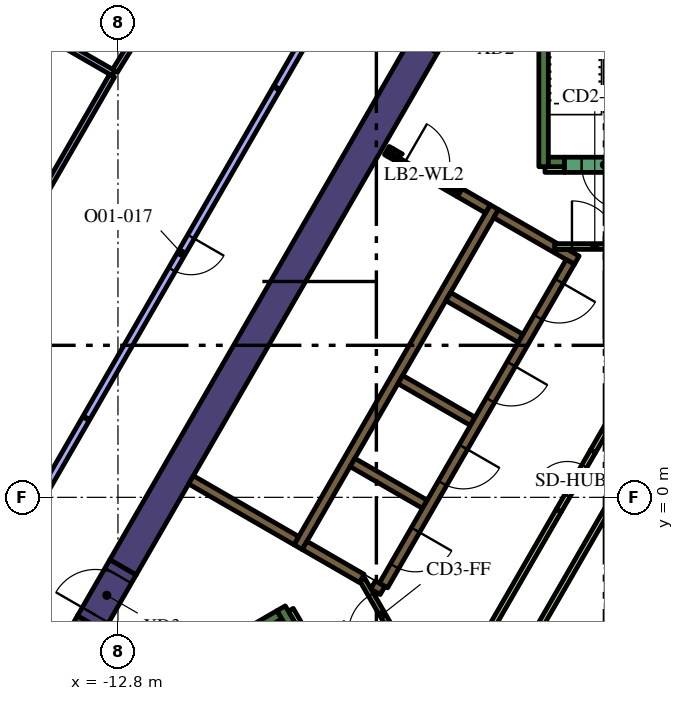
"""IFC4 building model, lengths in metres.
Left out: names, types, materials, properties, quantities, classifications, styles, units other than length and angle.
Written with IfcOpenShell. Run it as: python <this file> out.ifc"""

import sys

from ifc_helpers import new_model, si_unit, direction, frame, frame_2d, origin, place, context, subcontext, project, spatial, polyline, rectangle, outline, extrude, element, fill, save


model = new_model("IFC4")
c1 = context("Model", 3, precision=1e-05, world=origin(), true_north=direction((0.0, 1.0)))
c2 = subcontext(c1, "Body", "Model", "MODEL_VIEW")
j1 = project(units=[si_unit("LENGTHUNIT", "METRE"), si_unit("PLANEANGLEUNIT", "RADIAN")], contexts=[c1])
p1 = place(None, origin())
s1 = spatial("IfcSite", under=j1, at=p1, CompositionType="ELEMENT")
p2 = place(p1, origin())
s2 = spatial("IfcBuilding", under=s1, at=p2, CompositionType="ELEMENT")
p3 = place(p2, frame((0.0, 0.0, 145.8)))
s3 = spatial("IfcBuildingStorey", under=s2, at=p3, CompositionType="ELEMENT", Elevation=145.8)
p4 = place(p3, frame((-13.518, -3.314, 0.0), z_axis=(0.0, 0.0, 1.0), x_axis=(-0.499969377405, -0.866043083026, 0.0)))
e1 = element("IfcWall", 1, at=p4, inside=s3, PredefinedType="SOLIDWALL", context=c2, shape_type="SweptSolid", body=[
    extrude(rectangle(XDim=2.824, YDim=0.8, at=frame_2d((1.412, 0.0))), origin(), (0.0, 0.0, 1.0), 4.2),
])
p5 = place(p3, frame((-12.668, -1.842, 0.0), z_axis=(0.0, 0.0, 1.0), x_axis=(0.500003640647, 0.866023301845, 0.0)))
e2 = element("IfcWall", 2, at=p5, inside=s3, PredefinedType="SOLIDWALL", context=c2, shape_type="SweptSolid", body=[
    extrude(rectangle(XDim=15.858, YDim=0.8, at=frame_2d((7.929, 0.0))), origin(), (0.0, 0.0, 1.0), 4.2),
])
p6 = place(p3, frame((-1.6, 8.7, 0.0), z_axis=(0.0, 0.0, 1.0), x_axis=(0.0, 1.0, 0.0)))
e3 = element("IfcWall", 3, at=p6, inside=s3, PredefinedType="SOLIDWALL", context=c2, shape_type="SweptSolid", body=[
    extrude(rectangle(XDim=7.05, YDim=0.25, at=frame_2d((3.525, 0.0))), origin(), (0.0, 0.0, 1.0), 4.2),
])
p7 = place(p3, frame((-1.475, 8.825, 0.0), z_axis=(0.0, 0.0, 1.0), x_axis=(1.0, 0.0, 0.0)))
e4 = element("IfcWall", 4, at=p7, inside=s3, PredefinedType="SOLIDWALL", context=c2, shape_type="SweptSolid", body=[
    extrude(rectangle(XDim=0.425, YDim=0.25, at=frame_2d((0.212, 0.0))), origin(), (0.0, 0.0, 1.0), 4.2),
])
p8 = place(p3, frame((-14.44, -6.49, 0.0), z_axis=(0.0, 0.0, 1.0), x_axis=(0.866022966069, 0.500004222222, 0.0)))
e5 = element("IfcWall", 5, at=p8, inside=s3, PredefinedType="SOLIDWALL", context=c2, shape_type="SweptSolid", body=[
    extrude(rectangle(XDim=6.8, YDim=0.25, at=frame_2d((3.4, 0.0))), origin(), (0.0, 0.0, 1.0), 4.2),
])
p9 = place(p3, frame((-8.168, -3.503, 0.0), z_axis=(0.0, 0.0, 1.0), x_axis=(-0.499952099219, 0.866053057547, 0.0)))
e6 = element("IfcWall", 6, at=p9, inside=s3, PredefinedType="SOLIDWALL", context=c2, shape_type="SweptSolid", body=[
    extrude(rectangle(XDim=0.675, YDim=0.25, at=frame_2d((0.337, 0.0))), origin(), (0.0, 0.0, 1.0), 4.2),
])
p10 = place(p3, frame((-8.06, -1.311, 0.0), z_axis=(0.0, 0.0, 1.0), x_axis=(0.50000273126, 0.866023826885, 0.0)))
e7 = element("IfcWall", 7, at=p10, inside=s3, PredefinedType="SOLIDWALL", context=c2, shape_type="SweptSolid", body=[
    extrude(rectangle(XDim=10.33, YDim=0.25, at=frame_2d((5.165, 0.0))), origin(), (0.0, 0.0, 1.0), 4.2),
])
p11 = place(p3, origin())
e8 = element("IfcWall", 8, at=p11, inside=s3, PredefinedType="SOLIDWALL", context=c2, shape_type="SweptSolid", body=[
    extrude(outline(polyline([(-2.912, 7.356), (-2.787, 7.573), (-1.232, 6.675), (-1.303, 6.675), (-1.304, 6.675), (-1.304, 6.675), (-1.304, 6.525), (-1.304, 6.525), (-1.303, 6.525), (-0.971, 6.525), (-0.665, 6.348), (-0.79, 6.132), (-1.007, 6.257), (-1.007, 6.257), (-2.912, 7.356)])), origin(), (0.0, 0.0, 1.0), 4.2),
])
for number, where, z_axis, x_axis in (
    (9, (-2.204, 4.182, 0.0), (0.0, 0.0, 1.0), (-0.866, 0.5, 0.0)),
    (10, (-5.369, 3.1, 0.0), (0.0, 0.0, 1.0), (0.866, -0.5, 0.0)),
    (11, (-4.724, -0.182, 0.0), (0.0, 0.0, 1.0), (-0.866, 0.5, 0.0)),
):
    element("IfcWall", number, at=place(p3, frame(where, z_axis=z_axis, x_axis=x_axis)), inside=s3, PredefinedType="SOLIDWALL", context=c2, shape_type="SweptSolid", body=[
        extrude(rectangle(XDim=2.2, YDim=0.25, at=frame_2d((1.1, 0.0))), origin(), (0.0, 0.0, 1.0), 4.2),
    ])
p12 = place(p3, frame((-6.088, -2.305, 0.0), z_axis=(0.0, 0.0, 1.0), x_axis=(0.866059450854, -0.499941024108, 0.0)))
e12 = element("IfcWall", 12, at=p12, inside=s3, PredefinedType="SOLIDWALL", context=c2, shape_type="SweptSolid", body=[
    extrude(rectangle(XDim=0.29, YDim=0.25, at=frame_2d((0.145, 0.0))), origin(), (0.0, 0.0, 1.0), 4.2),
])
p13 = place(p3, frame((-7.889, -1.265, 0.0), z_axis=(0.0, 0.0, 1.0), x_axis=(0.865986741702, -0.500066958712, 0.0)))
e13 = element("IfcWall", 13, at=p13, inside=s3, PredefinedType="SOLIDWALL", context=c2, shape_type="SweptSolid", body=[
    extrude(rectangle(XDim=1.738, YDim=0.25, at=frame_2d((0.869, 0.0))), origin(), (0.0, 0.0, 1.0), 4.2),
])
p14 = place(p3, frame((-8.106, -1.14, 0.0), z_axis=(0.0, 0.0, 1.0), x_axis=(-0.866008981251, 0.500028443584, 0.0)))
e14 = element("IfcWall", 14, at=p14, inside=s3, PredefinedType="SOLIDWALL", context=c2, shape_type="SweptSolid", body=[
    extrude(rectangle(XDim=3.2, YDim=0.25, at=frame_2d((1.6, 0.0))), origin(), (0.0, 0.0, 1.0), 4.2),
])
p15 = place(p3, frame((-5.725, 9.125, 0.0), z_axis=(0.0, 0.0, 1.0), x_axis=(0.866185586049, -0.49972245349, 0.0)))
e15 = element("IfcWall", 15, at=p15, inside=s3, PredefinedType="SOLIDWALL", context=c2, shape_type="SweptSolid", body=[
    extrude(rectangle(XDim=0.11, YDim=0.25, at=frame_2d((0.055, 0.0))), origin(), (0.0, 0.0, 1.0), 4.2),
])
p16 = place(p3, frame((-3.066, 7.59, 0.0), z_axis=(0.0, 0.0, 1.0), x_axis=(-0.866081358704, 0.49990307071, 0.0)))
e16 = element("IfcWall", 16, at=p16, inside=s3, PredefinedType="SOLIDWALL", context=c2, shape_type="SweptSolid", body=[
    extrude(rectangle(XDim=0.858, YDim=0.25, at=frame_2d((0.429, 0.0))), origin(), (0.0, 0.0, 1.0), 4.2),
])
e17 = element("IfcWall", 17, at=p11, inside=s3, PredefinedType="SOLIDWALL", context=c2, shape_type="SweptSolid", body=[
    extrude(outline(polyline([(-3.748, 8.128), (-3.813, 8.015), (-4.027, 8.139), (-4.017, 8.156), (-4.008, 8.173), (-4.0, 8.192), (-3.995, 8.21), (-3.991, 8.23), (-3.99, 8.25), (-3.99, 8.268), (-3.748, 8.128)])), origin(), (0.0, 0.0, 1.0), 4.2),
])
e18 = element("IfcWall", 18, at=p11, inside=s3, PredefinedType="SOLIDWALL", context=c2, shape_type="SweptSolid", body=[
    extrude(outline(polyline([(-5.689, 8.96), (-5.69, 8.961), (-5.565, 9.177), (-5.319, 9.035), (-5.335, 9.026), (-5.351, 9.015), (-5.366, 9.002), (-5.379, 8.988), (-5.392, 8.972), (-5.402, 8.956), (-5.412, 8.939), (-5.629, 9.064), (-5.629, 9.064), (-5.689, 8.96)])), origin(), (0.0, 0.0, 1.0), 4.2),
])
for number, where, z_axis, x_axis in (
    (19, (-8.252, -2.958, 0.0), (0.0, 0.0, 1.0), (0.5, -0.866, 0.0)),
    (20, (-1.564, 8.625, 0.0), (0.0, 0.0, 1.0), (1.0, 0.0, 0.0)),
):
    element("IfcWall", number, at=place(p3, frame(where, z_axis=z_axis, x_axis=x_axis)), inside=s3, PredefinedType="PARTITIONING", context=c2, shape_type="SweptSolid", body=[
        extrude(rectangle(XDim=0.514, YDim=0.15, at=frame_2d((0.257, 0.0))), origin(), (0.0, 0.0, 1.0), 3.15),
    ])
p17 = place(p3, frame((-1.887, -3.718, 0.0), z_axis=(0.0, 0.0, 1.0), x_axis=(0.500005008002, 0.866022512394, 0.0)))
e21 = element("IfcWall", 21, at=p17, inside=s3, PredefinedType="PARTITIONING", context=c2, shape_type="SweptSolid", body=[
    extrude(rectangle(XDim=8.327, YDim=0.15, at=frame_2d((4.164, 0.0))), origin(), (0.0, 0.0, 1.0), 3.15),
])
p18 = place(p3, frame((-3.147, -3.718, 0.0), z_axis=(0.0, 0.0, 1.0), x_axis=(0.500010131483, 0.866019554291, 0.0)))
e22 = element("IfcWall", 22, at=p18, inside=s3, PredefinedType="PARTITIONING", context=c2, shape_type="SweptSolid", body=[
    extrude(rectangle(XDim=3.894, YDim=0.15, at=frame_2d((1.947, 0.0))), origin(), (0.0, 0.0, 1.0), 3.15),
])
p19 = place(p3, frame((-0.3, 1.212, 0.0), z_axis=(0.0, 0.0, 1.0), x_axis=(0.499963101113, 0.866046706318, 0.0)))
e23 = element("IfcWall", 23, at=p19, inside=s3, PredefinedType="PARTITIONING", context=c2, shape_type="SweptSolid", body=[
    extrude(rectangle(XDim=3.893, YDim=0.15, at=frame_2d((1.947, 0.0))), origin(), (0.0, 0.0, 1.0), 3.15),
])
p20 = place(p3, frame((-0.898, 6.194, 0.0), z_axis=(0.0, 0.0, 1.0), x_axis=(-0.499996202215, -0.866027596426, 0.0)))
e24 = element("IfcWall", 24, at=p20, inside=s3, PredefinedType="SOLIDWALL", context=c2, shape_type="SweptSolid", body=[
    extrude(rectangle(XDim=9.83, YDim=0.25, at=frame_2d((4.915, 0.0))), origin(), (0.0, 0.0, 1.0), 4.2),
])
p21 = place(p20, frame((0.585, 0.0, 0.0)))
e25 = element("IfcOpeningElement", 25, at=p21, cuts=e24, PredefinedType="OPENING", context=c2, shape_type="SweptSolid", body=[
    extrude(rectangle(XDim=1.1, YDim=2.1, at=frame_2d((0.55, 1.05))), frame((0.0, 0.135, 0.0), z_axis=(0.0, -1.0, 0.0), x_axis=(1.0, 0.0, 0.0)), (0.0, 0.0, 1.0), 0.27),
])
p22 = place(p20, frame((3.105, 0.0, 0.0)))
e26 = element("IfcOpeningElement", 26, at=p22, cuts=e24, PredefinedType="OPENING", context=c2, shape_type="SweptSolid", body=[
    extrude(rectangle(XDim=1.1, YDim=2.1, at=frame_2d((0.55, 1.05))), frame((0.0, 0.135, 0.0), z_axis=(0.0, -1.0, 0.0), x_axis=(1.0, 0.0, 0.0)), (0.0, 0.0, 1.0), 0.27),
])
p23 = place(p20, frame((5.625, 0.0, 0.0)))
e27 = element("IfcOpeningElement", 27, at=p23, cuts=e24, PredefinedType="OPENING", context=c2, shape_type="SweptSolid", body=[
    extrude(rectangle(XDim=1.1, YDim=2.1, at=frame_2d((0.55, 1.05))), frame((0.0, 0.135, 0.0), z_axis=(0.0, -1.0, 0.0), x_axis=(1.0, 0.0, 0.0)), (0.0, 0.0, 1.0), 0.27),
])
p24 = place(p20, frame((8.145, 0.0, 0.0)))
e28 = element("IfcOpeningElement", 28, at=p24, cuts=e24, PredefinedType="OPENING", context=c2, shape_type="SweptSolid", body=[
    extrude(rectangle(XDim=1.1, YDim=2.1, at=frame_2d((0.55, 1.05))), frame((0.0, 0.135, 0.0), z_axis=(0.0, -1.0, 0.0), x_axis=(1.0, 0.0, 0.0)), (0.0, 0.0, 1.0), 0.27),
])
p25 = place(p3, frame((1.05, 8.75, 0.0), z_axis=(0.0, 0.0, 1.0), x_axis=(-1.0, 0.0, 0.0)))
e29 = element("IfcWall", 29, at=p25, inside=s3, PredefinedType="SOLIDWALL", context=c2, shape_type="SweptSolid", body=[
    extrude(rectangle(XDim=2.1, YDim=0.4, at=frame_2d((1.05, 0.0))), origin(), (0.0, 0.0, 1.0), 4.2),
])
p26 = place(p25, frame((0.45, 0.0, 0.0)))
e30 = element("IfcOpeningElement", 30, at=p26, cuts=e29, PredefinedType="OPENING", context=c2, shape_type="SweptSolid", body=[
    extrude(rectangle(XDim=1.2, YDim=2.1, at=frame_2d((0.6, 1.05))), frame((0.0, 0.21, 0.0), z_axis=(0.0, -1.0, 0.0), x_axis=(1.0, 0.0, 0.0)), (0.0, 0.0, 1.0), 0.42),
])
p27 = place(p3, frame((-1.303, 6.6, 0.0), z_axis=(0.0, 0.0, 1.0), x_axis=(1.0, 0.0, 0.0)))
e31 = element("IfcWall", 31, at=p27, inside=s3, PredefinedType="PARTITIONING", context=c2, shape_type="SweptSolid", body=[
    extrude(rectangle(XDim=2.1, YDim=0.15, at=frame_2d((1.05, 0.0))), origin(), (0.0, 0.0, 1.0), 4.2),
])
p28 = place(p27, frame((0.45, 0.0, 0.0)))
e32 = element("IfcOpeningElement", 32, at=p28, cuts=e31, PredefinedType="OPENING", context=c2, shape_type="SweptSolid", body=[
    extrude(rectangle(XDim=1.2, YDim=2.1, at=frame_2d((0.6, 1.05))), frame((0.0, 0.085, 0.0), z_axis=(0.0, -1.0, 0.0), x_axis=(1.0, 0.0, 0.0)), (0.0, 0.0, 1.0), 0.17),
])
p29 = place(p3, frame((-5.317, -3.99, 0.0), z_axis=(0.0, 0.0, 1.0), x_axis=(-0.500027713859, 0.866009402589, 0.0)))
e33 = element("IfcWall", 33, at=p29, inside=s3, PredefinedType="PARTITIONING", context=c2, shape_type="SweptSolid", body=[
    extrude(rectangle(XDim=2.1, YDim=0.15, at=frame_2d((1.05, 0.0))), origin(), (0.0, 0.0, 1.0), 4.2),
])
p30 = place(p29, frame((0.45, 0.0, 0.0)))
e34 = element("IfcOpeningElement", 34, at=p30, cuts=e33, PredefinedType="OPENING", context=c2, shape_type="SweptSolid", body=[
    extrude(rectangle(XDim=1.2, YDim=2.1, at=frame_2d((0.6, 1.05))), frame((0.0, 0.085, 0.0), z_axis=(0.0, -1.0, 0.0), x_axis=(1.0, 0.0, 0.0)), (0.0, 0.0, 1.0), 0.17),
])
p31 = place(p3, frame((-5.659, 9.012, 0.0), z_axis=(0.0, 0.0, 1.0), x_axis=(0.866009402589, -0.500027713859, 0.0)))
e35 = element("IfcWall", 35, at=p31, inside=s3, PredefinedType="PARTITIONING", context=c2, shape_type="SweptSolid", body=[
    extrude(rectangle(XDim=2.1, YDim=0.12, at=frame_2d((1.05, 0.0))), origin(), (0.0, 0.0, 1.0), 3.15),
])
p32 = place(p31, frame((0.45, 0.0, 0.0)))
e36 = element("IfcOpeningElement", 36, at=p32, cuts=e35, PredefinedType="OPENING", context=c2, shape_type="SweptSolid", body=[
    extrude(rectangle(XDim=1.2, YDim=2.1, at=frame_2d((0.6, 1.05))), frame((0.0, 0.07, 0.0), z_axis=(0.0, -1.0, 0.0), x_axis=(1.0, 0.0, 0.0)), (0.0, 0.0, 1.0), 0.14),
])
p33 = place(p3, frame((-4.739, 11.892, 0.0), z_axis=(0.0, 0.0, 1.0), x_axis=(0.500062241894, 0.865989465428, 0.0)))
e37 = element("IfcWall", 37, at=p33, inside=s3, PredefinedType="SOLIDWALL", context=c2, shape_type="SweptSolid", body=[
    extrude(rectangle(XDim=1.7, YDim=0.8, at=frame_2d((0.85, 0.0))), origin(), (0.0, 0.0, 1.0), 4.2),
])
p34 = place(p33, frame((0.25, 0.0, 0.0)))
e38 = element("IfcOpeningElement", 38, at=p34, cuts=e37, PredefinedType="OPENING", context=c2, shape_type="SweptSolid", body=[
    extrude(rectangle(XDim=1.2, YDim=2.1, at=frame_2d((0.6, 1.05))), frame((0.0, 0.41, 0.0), z_axis=(0.0, -1.0, 0.0), x_axis=(1.0, 0.0, 0.0)), (0.0, 0.0, 1.0), 0.82),
])
p35 = place(p3, frame((-13.518, -3.314, 0.0), z_axis=(0.0, 0.0, 1.0), x_axis=(0.500062241894, 0.865989465428, 0.0)))
e39 = element("IfcWall", 39, at=p35, inside=s3, PredefinedType="SOLIDWALL", context=c2, shape_type="SweptSolid", body=[
    extrude(rectangle(XDim=1.7, YDim=0.8, at=frame_2d((0.85, 0.0))), origin(), (0.0, 0.0, 1.0), 4.2),
])
p36 = place(p35, frame((0.25, 0.0, 0.0)))
e40 = element("IfcOpeningElement", 40, at=p36, cuts=e39, PredefinedType="OPENING", context=c2, shape_type="SweptSolid", body=[
    extrude(rectangle(XDim=1.2, YDim=2.1, at=frame_2d((0.6, 1.05))), frame((0.0, 0.41, 0.0), z_axis=(0.0, -1.0, 0.0), x_axis=(1.0, 0.0, 0.0)), (0.0, 0.0, 1.0), 0.82),
])
p37 = place(p3, frame((-1.2, -0.346, 0.0), z_axis=(0.0, 0.0, 1.0), x_axis=(0.499961193289, 0.866047807691, 0.0)))
e41 = element("IfcWall", 41, at=p37, inside=s3, PredefinedType="PARTITIONING", context=c2, shape_type="SweptSolid", body=[
    extrude(rectangle(XDim=1.8, YDim=0.15, at=frame_2d((0.9, 0.0))), origin(), (0.0, 0.0, 1.0), 3.15),
])
p38 = place(p37, frame((0.45, 0.0, 0.0)))
e42 = element("IfcOpeningElement", 42, at=p38, cuts=e41, PredefinedType="OPENING", context=c2, shape_type="SweptSolid", body=[
    extrude(rectangle(XDim=0.9, YDim=2.1, at=frame_2d((0.45, 1.05))), frame((0.0, 0.085, 0.0), z_axis=(0.0, -1.0, 0.0), x_axis=(1.0, 0.0, 0.0)), (0.0, 0.0, 1.0), 0.17),
])
p39 = place(p3, frame((-12.917, 11.16, 0.0), z_axis=(0.0, 0.0, 1.0), x_axis=(-0.866039125629, 0.499976232315, 0.0)))
e43 = element("IfcWall", 43, at=p39, inside=s3, PredefinedType="PARTITIONING", context=c2, shape_type="SweptSolid", body=[
    extrude(rectangle(XDim=3.442, YDim=0.15, at=frame_2d((1.721, 0.0))), origin(), (0.0, 0.0, 1.0), 3.15),
])
p40 = place(p3, frame((-12.877, 11.224, 0.0), z_axis=(0.0, 0.0, 1.0), x_axis=(0.526202711334, 0.850359163286, 0.0)))
e44 = element("IfcWall", 44, at=p40, inside=s3, PredefinedType="PARTITIONING", context=c2, shape_type="SweptSolid", body=[
    extrude(rectangle(XDim=6.142, YDim=0.15, at=frame_2d((3.071, 0.0))), origin(), (0.0, 0.0, 1.0), 3.15),
])
p41 = place(p40, frame((2.642, 0.0, 0.0)))
e45 = element("IfcOpeningElement", 45, at=p41, cuts=e44, PredefinedType="OPENING", context=c2, shape_type="SweptSolid", body=[
    extrude(rectangle(XDim=0.9, YDim=2.1, at=frame_2d((0.45, 1.05))), frame((0.0, 0.085, 0.0), z_axis=(0.0, -1.0, 0.0), x_axis=(1.0, 0.0, 0.0)), (0.0, 0.0, 1.0), 0.17),
])
p42 = place(p3, frame((-12.954, 11.095, 0.0), z_axis=(0.0, 0.0, 1.0), x_axis=(-0.500282785331, -0.865862076027, 0.0)))
e46 = element("IfcWall", 46, at=p42, inside=s3, PredefinedType="PARTITIONING", context=c2, shape_type="SweptSolid", body=[
    extrude(rectangle(XDim=6.273, YDim=0.15, at=frame_2d((3.136, 0.0))), origin(), (0.0, 0.0, 1.0), 3.15),
])
p43 = place(p3, frame((-8.628, 10.755, 0.0), z_axis=(0.0, 0.0, 1.0), x_axis=(-0.500004234368, -0.866022959057, 0.0)))
e47 = element("IfcWall", 47, at=p43, inside=s3, PredefinedType="PARTITIONING", context=c2, shape_type="SweptSolid", body=[
    extrude(rectangle(XDim=10.0, YDim=0.2, at=frame_2d((5.0, 0.0))), origin(), (0.0, 0.0, 1.0), 3.15),
])
p44 = place(p43, frame((4.5, 0.0, 0.0)))
e48 = element("IfcOpeningElement", 48, at=p44, cuts=e47, PredefinedType="OPENING", context=c2, shape_type="SweptSolid", body=[
    extrude(rectangle(XDim=1.0, YDim=2.1, at=frame_2d((0.5, 1.05))), frame((0.0, 0.11, 0.0), z_axis=(0.0, -1.0, 0.0), x_axis=(1.0, 0.0, 0.0)), (0.0, 0.0, 1.0), 0.22),
])
p45 = place(p3, frame((-13.643, 2.069, 0.0), z_axis=(0.0, 0.0, 1.0), x_axis=(-0.500012305324, -0.866018299186, 0.0)))
e49 = element("IfcWall", 49, at=p45, inside=s3, PredefinedType="PARTITIONING", context=c2, shape_type="SweptSolid", body=[
    extrude(rectangle(XDim=9.721, YDim=0.2, at=frame_2d((4.861, 0.0))), origin(), (0.0, 0.0, 1.0), 3.15),
])
p46 = place(p3, frame((-4.167, 18.483, 0.0), z_axis=(0.0, 0.0, 1.0), x_axis=(-0.499974340325, -0.866040217898, 0.0)))
e50 = element("IfcWall", 50, at=p46, inside=s3, PredefinedType="PARTITIONING", context=c2, shape_type="SweptSolid", body=[
    extrude(rectangle(XDim=8.894, YDim=0.2, at=frame_2d((4.447, 0.0))), origin(), (0.0, 0.0, 1.0), 3.15),
])
p47 = place(p21, origin())
e51 = element("IfcDoor", 51, at=p47, inside=s3, OperationType="DOUBLE_DOOR_SLIDING", PredefinedType="DOOR", context=c2, shape_type="SweptSolid", body=[
    extrude(rectangle(XDim=1.1, YDim=2.1, at=frame_2d((0.55, 1.05))), frame((0.0, 0.025, 0.0), z_axis=(0.0, -1.0, 0.0), x_axis=(1.0, 0.0, 0.0)), (0.0, 0.0, 1.0), 0.05),
])
fill(e25, e51)
p48 = place(p22, origin())
e52 = element("IfcDoor", 52, at=p48, inside=s3, OperationType="DOUBLE_DOOR_SLIDING", PredefinedType="DOOR", context=c2, shape_type="SweptSolid", body=[
    extrude(rectangle(XDim=1.1, YDim=2.1, at=frame_2d((0.55, 1.05))), frame((0.0, 0.025, 0.0), z_axis=(0.0, -1.0, 0.0), x_axis=(1.0, 0.0, 0.0)), (0.0, 0.0, 1.0), 0.05),
])
fill(e26, e52)
p49 = place(p23, origin())
e53 = element("IfcDoor", 53, at=p49, inside=s3, OperationType="DOUBLE_DOOR_SLIDING", PredefinedType="DOOR", context=c2, shape_type="SweptSolid", body=[
    extrude(rectangle(XDim=1.1, YDim=2.1, at=frame_2d((0.55, 1.05))), frame((0.0, 0.025, 0.0), z_axis=(0.0, -1.0, 0.0), x_axis=(1.0, 0.0, 0.0)), (0.0, 0.0, 1.0), 0.05),
])
fill(e27, e53)
p50 = place(p24, origin())
e54 = element("IfcDoor", 54, at=p50, inside=s3, OperationType="DOUBLE_DOOR_SLIDING", PredefinedType="DOOR", context=c2, shape_type="SweptSolid", body=[
    extrude(rectangle(XDim=1.1, YDim=2.1, at=frame_2d((0.55, 1.05))), frame((0.0, 0.025, 0.0), z_axis=(0.0, -1.0, 0.0), x_axis=(1.0, 0.0, 0.0)), (0.0, 0.0, 1.0), 0.05),
])
fill(e28, e54)
p51 = place(p26, origin())
e55 = element("IfcDoor", 55, at=p51, inside=s3, OperationType="SINGLE_SWING_LEFT", PredefinedType="DOOR", context=c2, shape_type="SweptSolid", body=[
    extrude(rectangle(XDim=1.2, YDim=2.1, at=frame_2d((0.6, 1.05))), frame((0.0, 0.025, 0.0), z_axis=(0.0, -1.0, 0.0), x_axis=(1.0, 0.0, 0.0)), (0.0, 0.0, 1.0), 0.05),
])
fill(e30, e55)
p52 = place(p28, origin())
e56 = element("IfcDoor", 56, at=p52, inside=s3, OperationType="SINGLE_SWING_LEFT", PredefinedType="DOOR", context=c2, shape_type="SweptSolid", body=[
    extrude(rectangle(XDim=1.2, YDim=2.1, at=frame_2d((0.6, 1.05))), frame((0.0, 0.025, 0.0), z_axis=(0.0, -1.0, 0.0), x_axis=(1.0, 0.0, 0.0)), (0.0, 0.0, 1.0), 0.05),
])
fill(e32, e56)
p53 = place(p30, origin())
e57 = element("IfcDoor", 57, at=p53, inside=s3, OperationType="SINGLE_SWING_LEFT", PredefinedType="DOOR", context=c2, shape_type="SweptSolid", body=[
    extrude(rectangle(XDim=1.2, YDim=2.1, at=frame_2d((0.6, 1.05))), frame((0.0, 0.025, 0.0), z_axis=(0.0, -1.0, 0.0), x_axis=(1.0, 0.0, 0.0)), (0.0, 0.0, 1.0), 0.05),
])
fill(e34, e57)
p54 = place(p32, origin())
e58 = element("IfcDoor", 58, at=p54, inside=s3, OperationType="SINGLE_SWING_LEFT", PredefinedType="DOOR", context=c2, shape_type="SweptSolid", body=[
    extrude(rectangle(XDim=1.2, YDim=2.1, at=frame_2d((0.6, 1.05))), frame((0.0, 0.025, 0.0), z_axis=(0.0, -1.0, 0.0), x_axis=(1.0, 0.0, 0.0)), (0.0, 0.0, 1.0), 0.05),
])
fill(e36, e58)
p55 = place(p36, origin())
e59 = element("IfcDoor", 59, at=p55, inside=s3, OperationType="SINGLE_SWING_LEFT", PredefinedType="DOOR", context=c2, shape_type="SweptSolid", body=[
    extrude(rectangle(XDim=1.2, YDim=2.1, at=frame_2d((0.6, 1.05))), frame((0.0, 0.025, 0.0), z_axis=(0.0, -1.0, 0.0), x_axis=(1.0, 0.0, 0.0)), (0.0, 0.0, 1.0), 0.05),
])
fill(e40, e59)
p56 = place(p38, origin())
e60 = element("IfcDoor", 60, at=p56, inside=s3, OperationType="SINGLE_SWING_LEFT", PredefinedType="DOOR", context=c2, shape_type="SweptSolid", body=[
    extrude(rectangle(XDim=0.9, YDim=2.1, at=frame_2d((0.45, 1.05))), frame((0.0, 0.025, 0.0), z_axis=(0.0, -1.0, 0.0), x_axis=(1.0, 0.0, 0.0)), (0.0, 0.0, 1.0), 0.05),
])
fill(e42, e60)
p57 = place(p44, origin())
e61 = element("IfcDoor", 61, at=p57, inside=s3, OperationType="SINGLE_SWING_LEFT", PredefinedType="DOOR", context=c2, shape_type="SweptSolid", body=[
    extrude(rectangle(XDim=1.0, YDim=2.1, at=frame_2d((0.5, 1.05))), frame((0.0, 0.025, 0.0), z_axis=(0.0, -1.0, 0.0), x_axis=(1.0, 0.0, 0.0)), (0.0, 0.0, 1.0), 0.05),
])
fill(e48, e61)
save(model, sys.argv[1])
